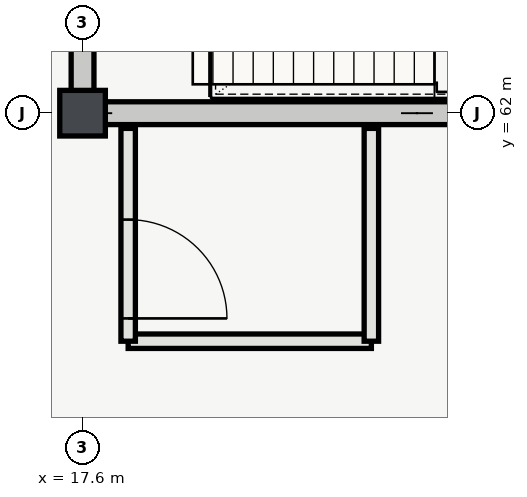
"""IFC4 building model, lengths in metres.
Left out: names, types, materials, properties, quantities, classifications, styles, units other than length and angle.
Written with IfcOpenShell. Run it as: python <this file> out.ifc"""

import sys

from ifc_helpers import new_model, si_unit, direction, frame, frame_2d, origin, origin_2d, place, context, subcontext, project, spatial, rectangle, extrude, element, fill, save


model = new_model("IFC4")
c1 = context("Model", 3, precision=1e-05, world=origin(), true_north=direction((0.0, 1.0)))
c2 = subcontext(c1, "Body", "Model", "MODEL_VIEW")
j1 = project(units=[si_unit("LENGTHUNIT", "METRE"), si_unit("PLANEANGLEUNIT", "RADIAN")], contexts=[c1])
p1 = place(None, origin())
s1 = spatial("IfcSite", under=j1, at=p1, CompositionType="ELEMENT")
p2 = place(p1, origin())
s2 = spatial("IfcBuilding", under=s1, at=p2, CompositionType="ELEMENT")
p3 = place(p2, frame((0.0, 0.0, 37.2)))
s3 = spatial("IfcBuildingStorey", under=s2, at=p3, CompositionType="ELEMENT", Elevation=37.2)
p4 = place(p3, frame((17.6, 62.0, 0.0), z_axis=(0.0, 0.0, 1.0), x_axis=(1.0, 0.0, 0.0)))
e1 = element("IfcColumn", 1, at=p4, inside=s3, PredefinedType="COLUMN", context=c2, shape_type="SweptSolid", body=[
    extrude(rectangle(XDim=0.6, YDim=0.6, at=origin_2d()), origin(), (0.0, 0.0, 1.0), 4.2),
])
p5 = place(p3, frame((17.45, 62.0, 0.0), z_axis=(0.0, 0.0, 1.0), x_axis=(1.0, 0.0, 0.0)))
e2 = element("IfcWall", 2, at=p5, inside=s3, PredefinedType="SHEAR", context=c2, shape_type="SweptSolid", body=[
    extrude(rectangle(XDim=9.1, YDim=0.3, at=frame_2d((4.55, 0.0))), origin(), (0.0, 0.0, 1.0), 3.92),
])
p6 = place(p3, frame((17.6, 62.15, 0.0), z_axis=(0.0, 0.0, 1.0), x_axis=(0.0, 1.0, 0.0)))
e3 = element("IfcWall", 3, at=p6, inside=s3, PredefinedType="SHEAR", context=c2, shape_type="SweptSolid", body=[
    extrude(rectangle(XDim=7.7, YDim=0.3, at=frame_2d((3.85, 0.0))), origin(), (0.0, 0.0, 1.0), 3.92),
])
p7 = place(p6, frame((1.65, 0.0, 0.0)))
e4 = element("IfcOpeningElement", 4, at=p7, cuts=e3, PredefinedType="OPENING", context=c2, shape_type="SweptSolid", body=[
    extrude(rectangle(XDim=1.4, YDim=2.2, at=frame_2d((0.7, 1.1))), frame((0.0, 0.16, 0.0), z_axis=(0.0, -1.0, 0.0), x_axis=(1.0, 0.0, 0.0)), (0.0, 0.0, 1.0), 0.32),
])
p8 = place(p6, frame((5.7, 0.0, 0.0)))
e5 = element("IfcOpeningElement", 5, at=p8, cuts=e3, PredefinedType="OPENING", context=c2, shape_type="SweptSolid", body=[
    extrude(rectangle(XDim=1.0, YDim=2.15, at=frame_2d((0.5, 1.075))), frame((0.0, 0.16, 0.0), z_axis=(0.0, -1.0, 0.0), x_axis=(1.0, 0.0, 0.0)), (0.0, 0.0, 1.0), 0.32),
])
p9 = place(p3, frame((18.2, 59.0, 0.0), z_axis=(0.0, 0.0, 1.0), x_axis=(1.0, 0.0, 0.0)))
e6 = element("IfcWall", 6, at=p9, inside=s3, PredefinedType="PARTITIONING", context=c2, shape_type="SweptSolid", body=[
    extrude(rectangle(XDim=3.2, YDim=0.19, at=frame_2d((1.6, 0.0))), origin(), (0.0, 0.0, 1.0), 3.92),
])
p10 = place(p3, frame((18.2, 61.8, 0.0), z_axis=(0.0, 0.0, 1.0), x_axis=(0.0, -1.0, 0.0)))
e7 = element("IfcWall", 7, at=p10, inside=s3, PredefinedType="PARTITIONING", context=c2, shape_type="SweptSolid", body=[
    extrude(rectangle(XDim=2.8, YDim=0.19, at=frame_2d((1.4, 0.0))), origin(), (0.0, 0.0, 1.0), 3.92),
])
p11 = place(p10, frame((1.2, 0.0, 0.0)))
e8 = element("IfcOpeningElement", 8, at=p11, cuts=e7, PredefinedType="OPENING", context=c2, shape_type="SweptSolid", body=[
    extrude(rectangle(XDim=1.3, YDim=2.2, at=frame_2d((0.65, 1.1))), frame((0.0, 0.105, 0.0), z_axis=(0.0, -1.0, 0.0), x_axis=(1.0, 0.0, 0.0)), (0.0, 0.0, 1.0), 0.21),
])
p12 = place(p3, frame((21.4, 59.0, 0.0), z_axis=(0.0, 0.0, 1.0), x_axis=(0.0, 1.0, 0.0)))
e9 = element("IfcWall", 9, at=p12, inside=s3, PredefinedType="PARTITIONING", context=c2, shape_type="SweptSolid", body=[
    extrude(rectangle(XDim=2.8, YDim=0.19, at=frame_2d((1.4, 0.0))), origin(), (0.0, 0.0, 1.0), 3.92),
])
p13 = place(p11, origin())
e10 = element("IfcDoor", 10, at=p13, inside=s3, OperationType="SINGLE_SWING_RIGHT", PredefinedType="DOOR", context=c2, shape_type="SweptSolid", body=[
    extrude(rectangle(XDim=1.3, YDim=2.2, at=frame_2d((0.65, 1.1))), frame((0.0, 0.025, 0.0), z_axis=(0.0, -1.0, 0.0), x_axis=(1.0, 0.0, 0.0)), (0.0, 0.0, 1.0), 0.05),
])
fill(e8, e10)
save(model, sys.argv[1])
